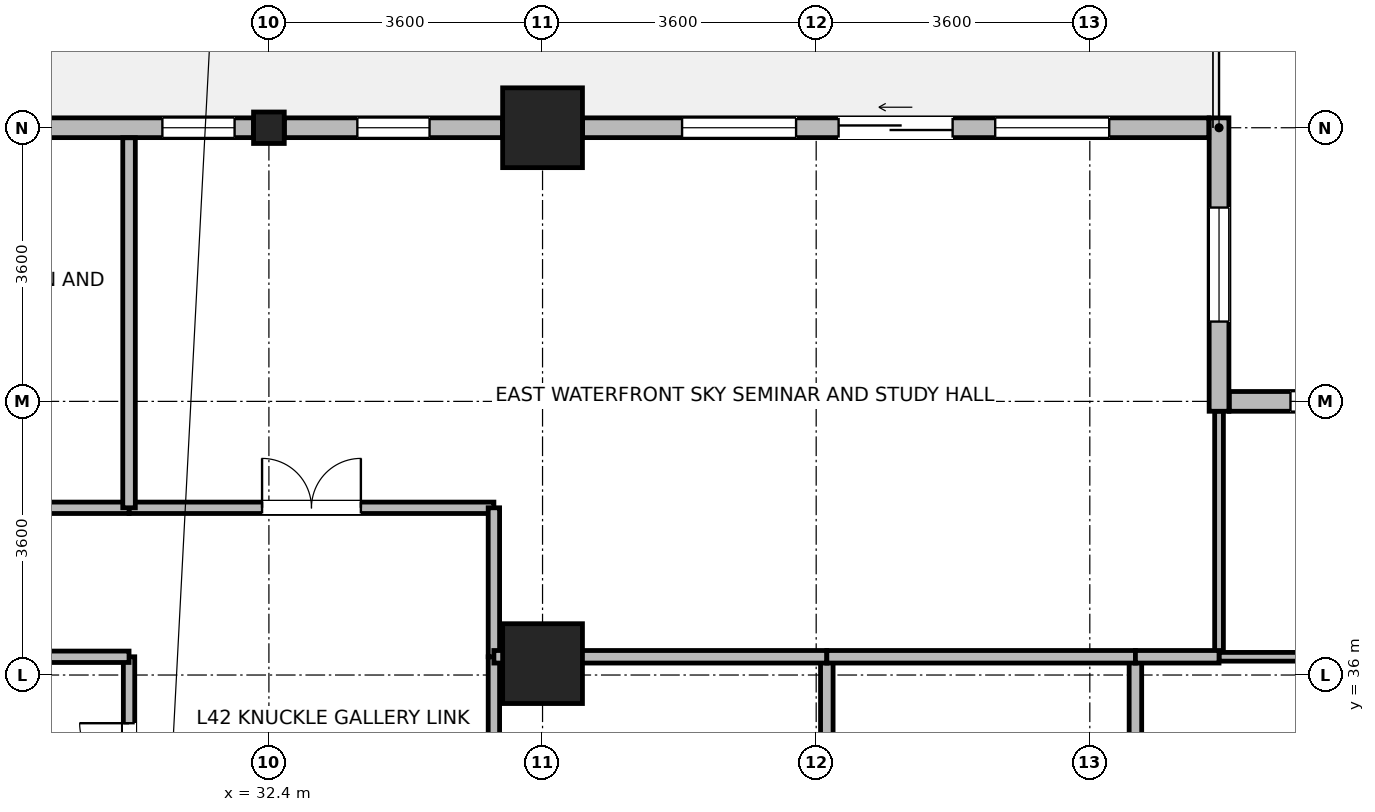
"""IFC4 building model, lengths in metres.
Left out: names, types, materials, properties, quantities, classifications, styles, units other than length and angle.
Written with IfcOpenShell. Run it as: python <this file> out.ifc"""

import sys

from ifc_helpers import new_model, si_unit, direction, frame, frame_2d, origin, origin_2d, place, context, subcontext, project, spatial, rectangle, i_section, extrude, source, transform, mapped, element, fill, save


model = new_model("IFC4")
c1 = context("Model", 3, precision=1e-05, world=origin(), true_north=direction((0.0, 1.0)))
c2 = subcontext(c1, "Body", "Model", "MODEL_VIEW")
j1 = project(units=[si_unit("LENGTHUNIT", "METRE"), si_unit("PLANEANGLEUNIT", "RADIAN")], contexts=[c1])
p1 = place(None, origin())
s1 = spatial("IfcSite", under=j1, at=p1, CompositionType="ELEMENT")
p2 = place(p1, origin())
s2 = spatial("IfcBuilding", under=s1, at=p2, CompositionType="ELEMENT")
p3 = place(p2, frame((0.0, 0.0, 166.1)))
s3 = spatial("IfcBuildingStorey", under=s2, at=p3, CompositionType="ELEMENT", Elevation=166.1)
m1 = source(origin(), c2, "Body", "SweptSolid", [
    extrude(rectangle(XDim=1.05, YDim=1.05, at=origin_2d()), origin(), (0.0, 0.0, 1.0), 3.7),
])
for number, where, z_axis, x_axis in (
    (1, (36.0, 43.2, 0.0), (0.0, 0.0, 1.0), (1.0, 0.0, 0.0)),
    (2, (36.0, 36.15, 0.0), (0.0, 0.0, 1.0), (1.0, 0.0, 0.0)),
):
    element("IfcColumn", number, at=place(p3, frame(where, z_axis=z_axis, x_axis=x_axis)), inside=s3, PredefinedType="COLUMN", context=c2, shape_type="MappedRepresentation", body=[
        mapped(m1, transform((0.0, 0.0, 0.0), x_axis=(1.0, 0.0, 0.0), y_axis=(0.0, 1.0, 0.0), z_axis=(0.0, 0.0, 1.0), scale=1.0)),
    ])
m2 = source(origin(), c2, "Body", "SweptSolid", [
    extrude(i_section(OverallWidth=0.404, OverallDepth=0.414, WebThickness=0.021, FlangeThickness=0.028, FilletRadius=0.015, at=origin_2d()), origin(), (0.0, 0.0, 1.0), 3.7),
])
p4 = place(p3, frame((32.4, 43.2, 0.0), z_axis=(0.0, 0.0, 1.0), x_axis=(1.0, 0.0, 0.0)))
e3 = element("IfcColumn", 3, at=p4, inside=s3, PredefinedType="COLUMN", context=c2, shape_type="MappedRepresentation", body=[
    mapped(m2, transform((0.0, 0.0, 0.0), x_axis=(1.0, 0.0, 0.0), y_axis=(0.0, 1.0, 0.0), z_axis=(0.0, 0.0, 1.0), scale=1.0)),
])
p5 = place(p3, frame((45.035, 39.6, 0.0), z_axis=(0.0, 0.0, 1.0), x_axis=(1.0, 0.0, 0.0)))
e4 = element("IfcWall", 4, at=p5, inside=s3, PredefinedType="STANDARD", context=c2, shape_type="SweptSolid", body=[
    extrude(rectangle(XDim=9.33, YDim=0.26, at=frame_2d((4.665, 0.0))), origin(), (0.0, 0.0, 1.0), 3.44),
])
p6 = place(p5, frame((0.805, 0.0, 0.85)))
e5 = element("IfcOpeningElement", 5, at=p6, cuts=e4, PredefinedType="OPENING", context=c2, shape_type="SweptSolid", body=[
    extrude(rectangle(XDim=1.5, YDim=1.85, at=frame_2d((0.75, 0.925))), frame((0.0, 0.14, 0.0), z_axis=(0.0, -1.0, 0.0), x_axis=(1.0, 0.0, 0.0)), (0.0, 0.0, 1.0), 0.28),
])
p7 = place(p5, frame((3.915, 0.0, 0.85)))
e6 = element("IfcOpeningElement", 6, at=p7, cuts=e4, PredefinedType="OPENING", context=c2, shape_type="SweptSolid", body=[
    extrude(rectangle(XDim=1.5, YDim=1.85, at=frame_2d((0.75, 0.925))), frame((0.0, 0.14, 0.0), z_axis=(0.0, -1.0, 0.0), x_axis=(1.0, 0.0, 0.0)), (0.0, 0.0, 1.0), 0.28),
])
p8 = place(p5, frame((7.025, 0.0, 0.85)))
e7 = element("IfcOpeningElement", 7, at=p8, cuts=e4, PredefinedType="OPENING", context=c2, shape_type="SweptSolid", body=[
    extrude(rectangle(XDim=1.5, YDim=1.85, at=frame_2d((0.75, 0.925))), frame((0.0, 0.14, 0.0), z_axis=(0.0, -1.0, 0.0), x_axis=(1.0, 0.0, 0.0)), (0.0, 0.0, 1.0), 0.28),
])
p9 = place(p3, frame((44.9, 43.33, 0.0), z_axis=(0.0, 0.0, 1.0), x_axis=(0.0, -1.0, 0.0)))
e8 = element("IfcWall", 8, at=p9, inside=s3, PredefinedType="STANDARD", context=c2, shape_type="SweptSolid", body=[
    extrude(rectangle(XDim=3.86, YDim=0.26, at=frame_2d((1.93, 0.0))), origin(), (0.0, 0.0, 1.0), 3.44),
])
p10 = place(p9, frame((1.18, 0.0, 0.85)))
e9 = element("IfcOpeningElement", 9, at=p10, cuts=e8, PredefinedType="OPENING", context=c2, shape_type="SweptSolid", body=[
    extrude(rectangle(XDim=1.5, YDim=1.85, at=frame_2d((0.75, 0.925))), frame((0.0, 0.14, 0.0), z_axis=(0.0, -1.0, 0.0), x_axis=(1.0, 0.0, 0.0)), (0.0, 0.0, 1.0), 0.28),
])
p11 = place(p3, frame((36.526, 43.2, 0.0), z_axis=(0.0, 0.0, 1.0), x_axis=(1.0, 0.0, 0.0)))
e10 = element("IfcWall", 10, at=p11, inside=s3, PredefinedType="STANDARD", context=c2, shape_type="SweptSolid", body=[
    extrude(rectangle(XDim=8.239, YDim=0.26, at=frame_2d((4.12, 0.0))), origin(), (0.0, 0.0, 1.0), 2.99),
])
p12 = place(p11, frame((3.369, 0.0, 0.0)))
e11 = element("IfcOpeningElement", 11, at=p12, cuts=e10, PredefinedType="OPENING", context=c2, shape_type="SweptSolid", body=[
    extrude(rectangle(XDim=1.5, YDim=2.15, at=frame_2d((0.75, 1.075))), frame((0.0, 0.14, 0.0), z_axis=(0.0, -1.0, 0.0), x_axis=(1.0, 0.0, 0.0)), (0.0, 0.0, 1.0), 0.28),
])
p13 = place(p11, frame((1.31, 0.0, 0.85)))
e12 = element("IfcOpeningElement", 12, at=p13, cuts=e10, PredefinedType="OPENING", context=c2, shape_type="SweptSolid", body=[
    extrude(rectangle(XDim=1.5, YDim=1.85, at=frame_2d((0.75, 0.925))), frame((0.0, 0.14, 0.0), z_axis=(0.0, -1.0, 0.0), x_axis=(1.0, 0.0, 0.0)), (0.0, 0.0, 1.0), 0.28),
])
p14 = place(p11, frame((5.429, 0.0, 0.85)))
e13 = element("IfcOpeningElement", 13, at=p14, cuts=e10, PredefinedType="OPENING", context=c2, shape_type="SweptSolid", body=[
    extrude(rectangle(XDim=1.5, YDim=1.85, at=frame_2d((0.75, 0.925))), frame((0.0, 0.14, 0.0), z_axis=(0.0, -1.0, 0.0), x_axis=(1.0, 0.0, 0.0)), (0.0, 0.0, 1.0), 0.28),
])
p15 = place(p3, frame((32.603, 43.2, 0.0), z_axis=(0.0, 0.0, 1.0), x_axis=(1.0, 0.0, 0.0)))
e14 = element("IfcWall", 14, at=p15, inside=s3, PredefinedType="STANDARD", context=c2, shape_type="SweptSolid", body=[
    extrude(rectangle(XDim=2.871, YDim=0.26, at=frame_2d((1.436, 0.0))), origin(), (0.0, 0.0, 1.0), 2.99),
])
p16 = place(p15, frame((0.96, 0.0, 0.85)))
e15 = element("IfcOpeningElement", 15, at=p16, cuts=e14, PredefinedType="OPENING", context=c2, shape_type="SweptSolid", body=[
    extrude(rectangle(XDim=0.95, YDim=1.75, at=frame_2d((0.475, 0.875))), frame((0.0, 0.14, 0.0), z_axis=(0.0, -1.0, 0.0), x_axis=(1.0, 0.0, 0.0)), (0.0, 0.0, 1.0), 0.28),
])
p17 = place(p3, frame((29.326, 43.2, 0.0), z_axis=(0.0, 0.0, 1.0), x_axis=(1.0, 0.0, 0.0)))
e16 = element("IfcWall", 16, at=p17, inside=s3, PredefinedType="STANDARD", context=c2, shape_type="SweptSolid", body=[
    extrude(rectangle(XDim=2.871, YDim=0.26, at=frame_2d((1.436, 0.0))), origin(), (0.0, 0.0, 1.0), 2.99),
])
p18 = place(p17, frame((1.673, 0.0, 0.85)))
e17 = element("IfcOpeningElement", 17, at=p18, cuts=e16, PredefinedType="OPENING", context=c2, shape_type="SweptSolid", body=[
    extrude(rectangle(XDim=0.95, YDim=1.75, at=frame_2d((0.475, 0.875))), frame((0.0, 0.14, 0.0), z_axis=(0.0, -1.0, 0.0), x_axis=(1.0, 0.0, 0.0)), (0.0, 0.0, 1.0), 0.28),
])
p19 = place(p3, frame((35.36, 28.56, 0.0), z_axis=(0.0, 0.0, 1.0), x_axis=(0.0, 1.0, 0.0)))
e18 = element("IfcWall", 18, at=p19, inside=s3, PredefinedType="PARTITIONING", context=c2, shape_type="SweptSolid", body=[
    extrude(rectangle(XDim=7.68, YDim=0.15, at=frame_2d((3.84, 0.0))), origin(), (0.0, 0.0, 1.0), 3.44),
])
p20 = place(p19, frame((3.19, 0.0, 0.0)))
e19 = element("IfcOpeningElement", 19, at=p20, cuts=e18, PredefinedType="OPENING", context=c2, shape_type="SweptSolid", body=[
    extrude(rectangle(XDim=1.3, YDim=2.12, at=frame_2d((0.65, 1.06))), frame((0.0, 0.085, 0.0), z_axis=(0.0, -1.0, 0.0), x_axis=(1.0, 0.0, 0.0)), (0.0, 0.0, 1.0), 0.17),
])
p21 = place(p3, frame((30.56, 38.2, 0.0), z_axis=(0.0, 0.0, 1.0), x_axis=(1.0, 0.0, 0.0)))
e20 = element("IfcWall", 20, at=p21, inside=s3, PredefinedType="PARTITIONING", context=c2, shape_type="SweptSolid", body=[
    extrude(rectangle(XDim=4.8, YDim=0.15, at=frame_2d((2.4, 0.0))), origin(), (0.0, 0.0, 1.0), 3.44),
])
p22 = place(p21, frame((1.75, 0.0, 0.0)))
e21 = element("IfcOpeningElement", 21, at=p22, cuts=e20, PredefinedType="OPENING", context=c2, shape_type="SweptSolid", body=[
    extrude(rectangle(XDim=1.3, YDim=2.12, at=frame_2d((0.65, 1.06))), frame((0.0, 0.085, 0.0), z_axis=(0.0, -1.0, 0.0), x_axis=(1.0, 0.0, 0.0)), (0.0, 0.0, 1.0), 0.17),
])
p23 = place(p3, frame((25.82, 38.2, 0.0), z_axis=(0.0, 0.0, 1.0), x_axis=(1.0, 0.0, 0.0)))
e22 = element("IfcWall", 22, at=p23, inside=s3, PredefinedType="PARTITIONING", context=c2, shape_type="SweptSolid", body=[
    extrude(rectangle(XDim=4.74, YDim=0.15, at=frame_2d((2.37, 0.0))), origin(), (0.0, 0.0, 1.0), 3.44),
])
p24 = place(p23, frame((1.92, 0.0, 0.0)))
e23 = element("IfcOpeningElement", 23, at=p24, cuts=e22, PredefinedType="OPENING", context=c2, shape_type="SweptSolid", body=[
    extrude(rectangle(XDim=0.9, YDim=2.08, at=frame_2d((0.45, 1.04))), frame((0.0, 0.085, 0.0), z_axis=(0.0, -1.0, 0.0), x_axis=(1.0, 0.0, 0.0)), (0.0, 0.0, 1.0), 0.17),
])
p25 = place(p3, frame((30.56, 33.7, 0.0), z_axis=(0.0, 0.0, 1.0), x_axis=(0.0, 1.0, 0.0)))
e24 = element("IfcWall", 24, at=p25, inside=s3, PredefinedType="PARTITIONING", context=c2, shape_type="SweptSolid", body=[
    extrude(rectangle(XDim=2.54, YDim=0.15, at=frame_2d((1.27, 0.0))), origin(), (0.0, 0.0, 1.0), 3.44),
])
p26 = place(p25, frame((0.366, 0.0, 0.0)))
e25 = element("IfcOpeningElement", 25, at=p26, cuts=e24, PredefinedType="OPENING", context=c2, shape_type="SweptSolid", body=[
    extrude(rectangle(XDim=1.3, YDim=2.12, at=frame_2d((0.65, 1.06))), frame((0.0, 0.085, 0.0), z_axis=(0.0, -1.0, 0.0), x_axis=(1.0, 0.0, 0.0)), (0.0, 0.0, 1.0), 0.17),
])
p27 = place(p3, frame((35.36, 36.24, 0.0), z_axis=(0.0, 0.0, 1.0), x_axis=(0.0, 1.0, 0.0)))
e26 = element("IfcWall", 26, at=p27, inside=s3, PredefinedType="PARTITIONING", context=c2, shape_type="SweptSolid", body=[
    extrude(rectangle(XDim=1.96, YDim=0.15, at=frame_2d((0.98, 0.0))), origin(), (0.0, 0.0, 1.0), 3.44),
])
p28 = place(p3, frame((29.325, 36.24, 0.0), z_axis=(0.0, 0.0, 1.0), x_axis=(1.0, 0.0, 0.0)))
e27 = element("IfcWall", 27, at=p28, inside=s3, PredefinedType="PARTITIONING", context=c2, shape_type="SweptSolid", body=[
    extrude(rectangle(XDim=1.235, YDim=0.15, at=frame_2d((0.618, 0.0))), origin(), (0.0, 0.0, 1.0), 2.84),
])
for number, where, z_axis, x_axis in (
    (28, (39.74, 28.56, 0.0), (0.0, 0.0, 1.0), (0.0, 1.0, 0.0)),
    (29, (43.8, 28.56, 0.0), (0.0, 0.0, 1.0), (0.0, 1.0, 0.0)),
):
    element("IfcWall", number, at=place(p3, frame(where, z_axis=z_axis, x_axis=x_axis)), inside=s3, PredefinedType="PARTITIONING", context=c2, shape_type="SweptSolid", body=[
        extrude(rectangle(XDim=7.68, YDim=0.165, at=frame_2d((3.84, 0.0))), origin(), (0.0, 0.0, 1.0), 3.44),
    ])
p29 = place(p3, frame((44.9, 36.24, 0.0), z_axis=(0.0, 0.0, 1.0), x_axis=(0.0, 1.0, 0.0)))
e30 = element("IfcWall", 30, at=p29, inside=s3, PredefinedType="PARTITIONING", context=c2, shape_type="SweptSolid", body=[
    extrude(rectangle(XDim=3.228, YDim=0.115, at=frame_2d((1.614, 0.0))), origin(), (0.0, 0.0, 1.0), 3.44),
])
p30 = place(p3, frame((30.56, 38.2, 0.0), z_axis=(0.0, 0.0, 1.0), x_axis=(0.0, 1.0, 0.0)))
e31 = element("IfcWall", 31, at=p30, inside=s3, PredefinedType="PARTITIONING", context=c2, shape_type="SweptSolid", body=[
    extrude(rectangle(XDim=4.868, YDim=0.165, at=frame_2d((2.434, 0.0))), origin(), (0.0, 0.0, 1.0), 3.44),
])
p31 = place(p3, frame((35.36, 36.24, 0.0), z_axis=(0.0, 0.0, 1.0), x_axis=(1.0, 0.0, 0.0)))
e32 = element("IfcWall", 32, at=p31, inside=s3, PredefinedType="PARTITIONING", context=c2, shape_type="SweptSolid", body=[
    extrude(rectangle(XDim=4.38, YDim=0.165, at=frame_2d((2.19, 0.0))), origin(), (0.0, 0.0, 1.0), 2.84),
])
p32 = place(p3, frame((39.74, 36.24, 0.0), z_axis=(0.0, 0.0, 1.0), x_axis=(1.0, 0.0, 0.0)))
e33 = element("IfcWall", 33, at=p32, inside=s3, PredefinedType="PARTITIONING", context=c2, shape_type="SweptSolid", body=[
    extrude(rectangle(XDim=4.06, YDim=0.165, at=frame_2d((2.03, 0.0))), origin(), (0.0, 0.0, 1.0), 2.84),
])
p33 = place(p3, frame((44.9, 36.24, 0.0), z_axis=(0.0, 0.0, 1.0), x_axis=(1.0, 0.0, 0.0)))
e34 = element("IfcWall", 34, at=p33, inside=s3, PredefinedType="PARTITIONING", context=c2, shape_type="SweptSolid", body=[
    extrude(rectangle(XDim=1.375, YDim=0.115, at=frame_2d((0.688, 0.0))), origin(), (0.0, 0.0, 1.0), 2.84),
])
p34 = place(p3, frame((43.8, 36.24, 0.0), z_axis=(0.0, 0.0, 1.0), x_axis=(1.0, 0.0, 0.0)))
e35 = element("IfcWall", 35, at=p34, inside=s3, PredefinedType="PARTITIONING", context=c2, shape_type="SweptSolid", body=[
    extrude(rectangle(XDim=1.1, YDim=0.165, at=frame_2d((0.55, 0.0))), origin(), (0.0, 0.0, 1.0), 2.84),
])
p35 = place(p6, origin())
e36 = element("IfcWindow", 36, at=p35, inside=s3, PartitioningType="SINGLE_PANEL", PredefinedType="WINDOW", context=c2, shape_type="SweptSolid", body=[
    extrude(rectangle(XDim=1.5, YDim=1.85, at=frame_2d((0.75, 0.925))), frame((0.0, 0.03, 0.0), z_axis=(0.0, -1.0, 0.0), x_axis=(1.0, 0.0, 0.0)), (0.0, 0.0, 1.0), 0.06),
])
fill(e5, e36)
p36 = place(p10, origin())
e37 = element("IfcWindow", 37, at=p36, inside=s3, PartitioningType="SINGLE_PANEL", PredefinedType="WINDOW", context=c2, shape_type="SweptSolid", body=[
    extrude(rectangle(XDim=1.5, YDim=1.85, at=frame_2d((0.75, 0.925))), frame((0.0, 0.03, 0.0), z_axis=(0.0, -1.0, 0.0), x_axis=(1.0, 0.0, 0.0)), (0.0, 0.0, 1.0), 0.06),
])
fill(e9, e37)
p37 = place(p12, origin())
e38 = element("IfcDoor", 38, at=p37, inside=s3, OperationType="SLIDING_TO_LEFT", PredefinedType="DOOR", context=c2, shape_type="SweptSolid", body=[
    extrude(rectangle(XDim=1.5, YDim=2.15, at=frame_2d((0.75, 1.075))), frame((0.0, 0.025, 0.0), z_axis=(0.0, -1.0, 0.0), x_axis=(1.0, 0.0, 0.0)), (0.0, 0.0, 1.0), 0.05),
])
fill(e11, e38)
p38 = place(p13, origin())
e39 = element("IfcWindow", 39, at=p38, inside=s3, PartitioningType="SINGLE_PANEL", PredefinedType="WINDOW", context=c2, shape_type="SweptSolid", body=[
    extrude(rectangle(XDim=1.5, YDim=1.85, at=frame_2d((0.75, 0.925))), frame((0.0, 0.03, 0.0), z_axis=(0.0, -1.0, 0.0), x_axis=(1.0, 0.0, 0.0)), (0.0, 0.0, 1.0), 0.06),
])
fill(e12, e39)
p39 = place(p14, origin())
e40 = element("IfcWindow", 40, at=p39, inside=s3, PartitioningType="SINGLE_PANEL", PredefinedType="WINDOW", context=c2, shape_type="SweptSolid", body=[
    extrude(rectangle(XDim=1.5, YDim=1.85, at=frame_2d((0.75, 0.925))), frame((0.0, 0.03, 0.0), z_axis=(0.0, -1.0, 0.0), x_axis=(1.0, 0.0, 0.0)), (0.0, 0.0, 1.0), 0.06),
])
fill(e13, e40)
p40 = place(p16, origin())
e41 = element("IfcWindow", 41, at=p40, inside=s3, PartitioningType="SINGLE_PANEL", PredefinedType="WINDOW", context=c2, shape_type="SweptSolid", body=[
    extrude(rectangle(XDim=0.95, YDim=1.75, at=frame_2d((0.475, 0.875))), frame((0.0, 0.03, 0.0), z_axis=(0.0, -1.0, 0.0), x_axis=(1.0, 0.0, 0.0)), (0.0, 0.0, 1.0), 0.06),
])
fill(e15, e41)
p41 = place(p18, origin())
e42 = element("IfcWindow", 42, at=p41, inside=s3, PartitioningType="SINGLE_PANEL", PredefinedType="WINDOW", context=c2, shape_type="SweptSolid", body=[
    extrude(rectangle(XDim=0.95, YDim=1.75, at=frame_2d((0.475, 0.875))), frame((0.0, 0.03, 0.0), z_axis=(0.0, -1.0, 0.0), x_axis=(1.0, 0.0, 0.0)), (0.0, 0.0, 1.0), 0.06),
])
fill(e17, e42)
p42 = place(p22, origin())
e43 = element("IfcDoor", 43, at=p42, inside=s3, OperationType="DOUBLE_DOOR_SINGLE_SWING", PredefinedType="DOOR", context=c2, shape_type="SweptSolid", body=[
    extrude(rectangle(XDim=1.3, YDim=2.12, at=frame_2d((0.65, 1.06))), frame((0.0, 0.025, 0.0), z_axis=(0.0, -1.0, 0.0), x_axis=(1.0, 0.0, 0.0)), (0.0, 0.0, 1.0), 0.05),
])
fill(e21, e43)
p43 = place(p26, origin())
e44 = element("IfcDoor", 44, at=p43, inside=s3, OperationType="DOUBLE_DOOR_SINGLE_SWING", PredefinedType="DOOR", context=c2, shape_type="SweptSolid", body=[
    extrude(rectangle(XDim=1.3, YDim=2.12, at=frame_2d((0.65, 1.06))), frame((0.0, 0.025, 0.0), z_axis=(0.0, -1.0, 0.0), x_axis=(1.0, 0.0, 0.0)), (0.0, 0.0, 1.0), 0.05),
])
fill(e25, e44)
save(model, sys.argv[1])
